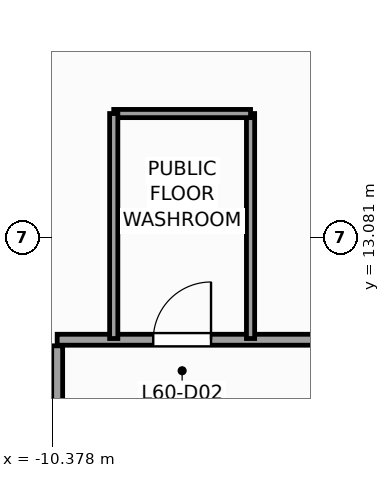
"""IFC4 building model, lengths in metres.
Left out: names, types, materials, properties, quantities, classifications, styles, units other than length and angle.
Written with IfcOpenShell. Run it as: python <this file> out.ifc"""

import sys

from ifc_helpers import new_model, si_unit, direction, frame, frame_2d, origin, place, context, subcontext, project, spatial, rectangle, extrude, source, transform, mapped, element, fill, save


model = new_model("IFC4")
c1 = context("Model", 3, precision=1e-05, world=origin(), true_north=direction((0.0, 1.0)))
c2 = subcontext(c1, "Body", "Model", "MODEL_VIEW")
j1 = project(units=[si_unit("LENGTHUNIT", "METRE"), si_unit("PLANEANGLEUNIT", "RADIAN")], contexts=[c1])
p1 = place(None, origin())
s1 = spatial("IfcSite", under=j1, at=p1, CompositionType="ELEMENT")
p2 = place(p1, origin())
s2 = spatial("IfcBuilding", under=s1, at=p2, CompositionType="ELEMENT")
p3 = place(p2, frame((0.0, 0.0, 248.5)))
s3 = spatial("IfcBuildingStorey", under=s2, at=p3, CompositionType="ELEMENT", Elevation=248.5)
p4 = place(p3, frame((-6.733, 29.154, 0.0), z_axis=(0.0, 0.0, 1.0), x_axis=(-0.629325378072, -0.77714192302, 0.0)))
e1 = element("IfcWall", 1, at=p4, inside=s3, PredefinedType="STANDARD", context=c2, shape_type="SweptSolid", body=[
    extrude(rectangle(XDim=36.84, YDim=0.34, at=frame_2d((18.42, 0.0))), origin(), (0.0, 0.0, 1.0), 2.96),
])
p5 = place(p4, frame((12.295, 0.0, 0.0)))
e2 = element("IfcOpeningElement", 2, at=p5, cuts=e1, PredefinedType="OPENING", context=c2, shape_type="SweptSolid", body=[
    extrude(rectangle(XDim=1.05, YDim=2.25, at=frame_2d((0.525, 1.125))), frame((0.0, 0.18, 0.0), z_axis=(0.0, -1.0, 0.0), x_axis=(1.0, 0.0, 0.0)), (0.0, 0.0, 1.0), 0.36),
])
p6 = place(p4, frame((3.721, 0.0, 0.48)))
e3 = element("IfcOpeningElement", 3, at=p6, cuts=e1, PredefinedType="OPENING", context=c2, shape_type="SweptSolid", body=[
    extrude(rectangle(XDim=1.4, YDim=2.4, at=frame_2d((0.7, 1.2))), frame((0.0, 0.18, 0.0), z_axis=(0.0, -1.0, 0.0), x_axis=(1.0, 0.0, 0.0)), (0.0, 0.0, 1.0), 0.36),
])
p7 = place(p4, frame((9.059, 0.0, 0.58)))
e4 = element("IfcOpeningElement", 4, at=p7, cuts=e1, PredefinedType="OPENING", context=c2, shape_type="SweptSolid", body=[
    extrude(rectangle(XDim=1.75, YDim=2.3, at=frame_2d((0.875, 1.15))), frame((0.0, 0.18, 0.0), z_axis=(0.0, -1.0, 0.0), x_axis=(1.0, 0.0, 0.0)), (0.0, 0.0, 1.0), 0.36),
])
p8 = place(p4, frame((16.058, 0.0, 0.58)))
e5 = element("IfcOpeningElement", 5, at=p8, cuts=e1, PredefinedType="OPENING", context=c2, shape_type="SweptSolid", body=[
    extrude(rectangle(XDim=1.75, YDim=2.3, at=frame_2d((0.875, 1.15))), frame((0.0, 0.18, 0.0), z_axis=(0.0, -1.0, 0.0), x_axis=(1.0, 0.0, 0.0)), (0.0, 0.0, 1.0), 0.36),
])
p9 = place(p4, frame((24.176, 0.0, 0.58)))
e6 = element("IfcOpeningElement", 6, at=p9, cuts=e1, PredefinedType="OPENING", context=c2, shape_type="SweptSolid", body=[
    extrude(rectangle(XDim=1.75, YDim=2.3, at=frame_2d((0.875, 1.15))), frame((0.0, 0.18, 0.0), z_axis=(0.0, -1.0, 0.0), x_axis=(1.0, 0.0, 0.0)), (0.0, 0.0, 1.0), 0.36),
])
p10 = place(p4, frame((30.982, 0.0, 0.48)))
e7 = element("IfcOpeningElement", 7, at=p10, cuts=e1, PredefinedType="OPENING", context=c2, shape_type="SweptSolid", body=[
    extrude(rectangle(XDim=1.4, YDim=2.4, at=frame_2d((0.7, 1.2))), frame((0.0, 0.18, 0.0), z_axis=(0.0, -1.0, 0.0), x_axis=(1.0, 0.0, 0.0)), (0.0, 0.0, 1.0), 0.36),
])
p11 = place(p3, frame((-10.3, 11.4, 0.0), z_axis=(0.0, 0.0, 1.0), x_axis=(1.0, 0.0, 0.0)))
e8 = element("IfcWall", 8, at=p11, inside=s3, PredefinedType="PARTITIONING", context=c2, shape_type="SweptSolid", body=[
    extrude(rectangle(XDim=22.75, YDim=0.18, at=frame_2d((11.375, 0.0))), origin(), (0.0, 0.0, 1.0), 3.66),
])
p12 = place(p11, frame((11.136, 0.0, 0.0)))
e9 = element("IfcOpeningElement", 9, at=p12, cuts=e8, PredefinedType="OPENING", context=c2, shape_type="SweptSolid", body=[
    extrude(rectangle(XDim=0.95, YDim=2.1, at=frame_2d((0.475, 1.05))), frame((0.0, 0.1, 0.0), z_axis=(0.0, -1.0, 0.0), x_axis=(1.0, 0.0, 0.0)), (0.0, 0.0, 1.0), 0.2),
])
p13 = place(p11, frame((1.58, 0.0, 0.0)))
e10 = element("IfcOpeningElement", 10, at=p13, cuts=e8, PredefinedType="OPENING", context=c2, shape_type="SweptSolid", body=[
    extrude(rectangle(XDim=0.95, YDim=2.1, at=frame_2d((0.475, 1.05))), frame((0.0, 0.1, 0.0), z_axis=(0.0, -1.0, 0.0), x_axis=(1.0, 0.0, 0.0)), (0.0, 0.0, 1.0), 0.2),
])
p14 = place(p3, frame((-10.3, -10.2, 0.0), z_axis=(0.0, 0.0, 1.0), x_axis=(0.0, 1.0, 0.0)))
e11 = element("IfcWall", 11, at=p14, inside=s3, PredefinedType="PARTITIONING", context=c2, shape_type="SweptSolid", body=[
    extrude(rectangle(XDim=21.5, YDim=0.18, at=frame_2d((10.75, 0.0))), origin(), (0.0, 0.0, 1.0), 3.66),
])
p15 = place(p14, frame((15.135, 0.0, 0.0)))
e12 = element("IfcOpeningElement", 12, at=p15, cuts=e11, PredefinedType="OPENING", context=c2, shape_type="SweptSolid", body=[
    extrude(rectangle(XDim=1.1, YDim=2.2, at=frame_2d((0.55, 1.1))), frame((0.0, 0.1, 0.0), z_axis=(0.0, -1.0, 0.0), x_axis=(1.0, 0.0, 0.0)), (0.0, 0.0, 1.0), 0.2),
])
p16 = place(p14, frame((6.25, 0.0, 0.0)))
e13 = element("IfcOpeningElement", 13, at=p16, cuts=e11, PredefinedType="OPENING", context=c2, shape_type="SweptSolid", body=[
    extrude(rectangle(XDim=1.1, YDim=2.2, at=frame_2d((0.55, 1.1))), frame((0.0, 0.1, 0.0), z_axis=(0.0, -1.0, 0.0), x_axis=(1.0, 0.0, 0.0)), (0.0, 0.0, 1.0), 0.2),
])
p17 = place(p3, frame((-7.12, 11.42, 0.0), z_axis=(0.0, 0.0, 1.0), x_axis=(0.0, 1.0, 0.0)))
e14 = element("IfcWall", 14, at=p17, inside=s3, PredefinedType="PARTITIONING", context=c2, shape_type="SweptSolid", body=[
    extrude(rectangle(XDim=3.7, YDim=0.135, at=frame_2d((1.85, 0.0))), origin(), (0.0, 0.0, 1.0), 3.66),
])
p18 = place(p3, frame((-9.37, 15.12, 0.0), z_axis=(0.0, 0.0, 1.0), x_axis=(1.0, 0.0, 0.0)))
e15 = element("IfcWall", 15, at=p18, inside=s3, PredefinedType="PARTITIONING", context=c2, shape_type="SweptSolid", body=[
    extrude(rectangle(XDim=2.25, YDim=0.135, at=frame_2d((1.125, 0.0))), origin(), (0.0, 0.0, 1.0), 3.66),
])
p19 = place(p3, frame((-9.37, 11.42, 0.0), z_axis=(0.0, 0.0, 1.0), x_axis=(0.0, 1.0, 0.0)))
e16 = element("IfcWall", 16, at=p19, inside=s3, PredefinedType="PARTITIONING", context=c2, shape_type="SweptSolid", body=[
    extrude(rectangle(XDim=3.7, YDim=0.135, at=frame_2d((1.85, 0.0))), origin(), (0.0, 0.0, 1.0), 3.66),
])
m1 = source(origin(), c2, "Body", "SweptSolid", [
    extrude(rectangle(XDim=0.95, YDim=2.1, at=frame_2d((0.475, 1.05))), frame((0.0, 0.025, 0.0), z_axis=(0.0, -1.0, 0.0), x_axis=(1.0, 0.0, 0.0)), (0.0, 0.0, 1.0), 0.05),
])
p20 = place(p13, origin())
e17 = element("IfcDoor", 17, at=p20, inside=s3, OperationType="SINGLE_SWING_RIGHT", PredefinedType="DOOR", context=c2, shape_type="MappedRepresentation", body=[
    mapped(m1, transform((0.0, 0.0, 0.0), scale=1.0)),
])
fill(e10, e17)
save(model, sys.argv[1])
